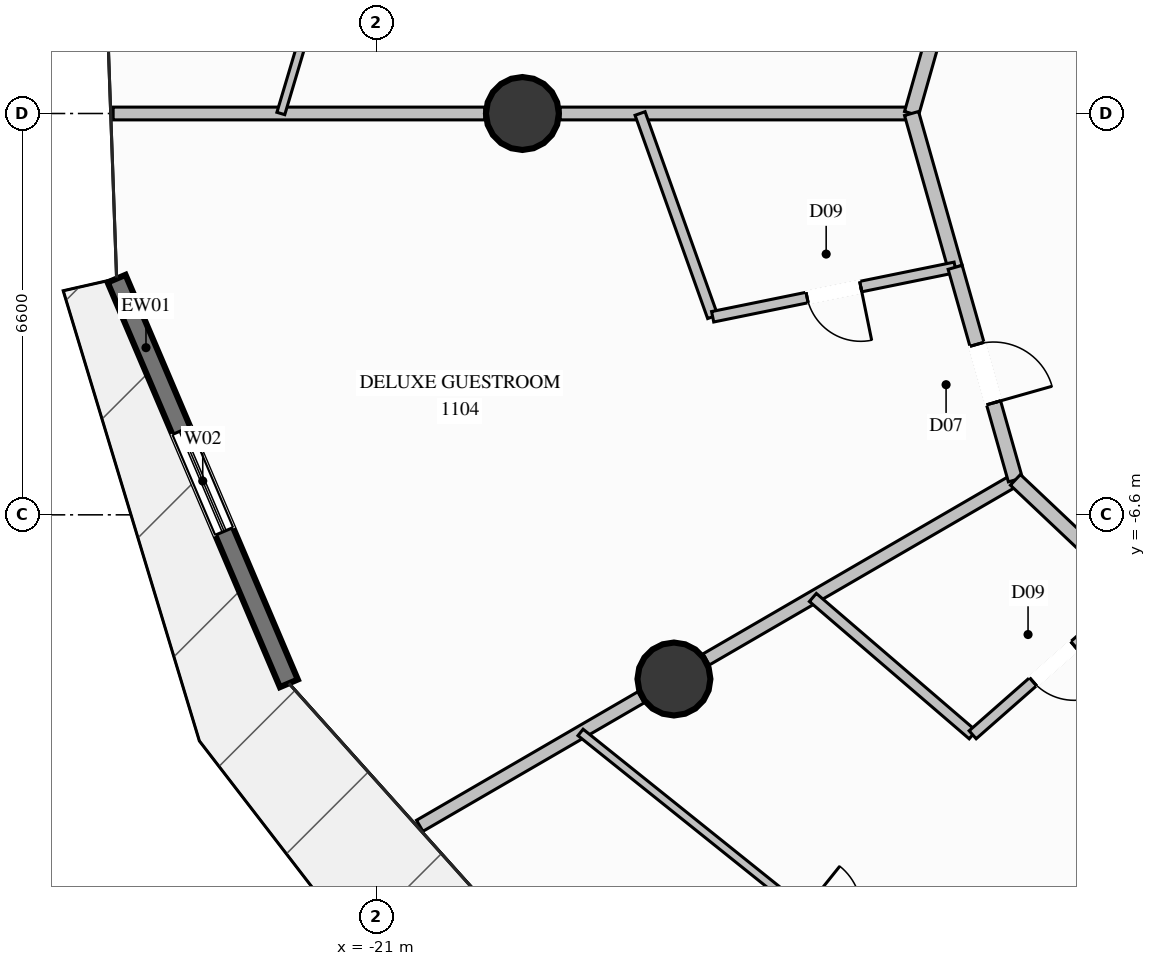
"""IFC4 building model, lengths in metres.
Left out: names, types, materials, properties, quantities, classifications, styles, units other than length and angle.
Written with IfcOpenShell. Run it as: python <this file> out.ifc"""

import sys

from ifc_helpers import new_model, si_unit, direction, frame, frame_2d, origin, origin_2d, place, context, subcontext, project, spatial, rectangle, circle, extrude, element, fill, save


model = new_model("IFC4")
c1 = context("Model", 3, precision=1e-05, world=origin(), true_north=direction((0.0, 1.0)))
c2 = subcontext(c1, "Body", "Model", "MODEL_VIEW")
j1 = project(units=[si_unit("LENGTHUNIT", "METRE"), si_unit("PLANEANGLEUNIT", "RADIAN")], contexts=[c1])
p1 = place(None, origin())
s1 = spatial("IfcSite", under=j1, at=p1, CompositionType="ELEMENT")
p2 = place(p1, origin())
s2 = spatial("IfcBuilding", under=s1, at=p2, CompositionType="ELEMENT")
p3 = place(p2, frame((0.0, 0.0, 42.8)))
s3 = spatial("IfcBuildingStorey", under=s2, at=p3, CompositionType="ELEMENT", Elevation=42.8)
for number, where, z_axis, x_axis in (
    (1, (-18.6, 0.0, 0.0), (0.0, 0.0, 1.0), (1.0, 0.0, 0.0)),
    (2, (-16.108, -9.3, 0.0), (0.0, 0.0, 1.0), (1.0, 0.0, 0.0)),
):
    element("IfcColumn", number, at=place(p3, frame(where, z_axis=z_axis, x_axis=x_axis)), inside=s3, PredefinedType="COLUMN", context=c2, shape_type="SweptSolid", body=[
        extrude(circle(Radius=0.6, at=origin_2d()), origin(), (0.0, 0.0, 1.0), 3.6),
    ])
p4 = place(p3, frame((-22.441, -9.371, 0.0), z_axis=(0.0, 0.0, 1.0), x_axis=(-0.391681637704, 0.920100806806, 0.0)))
e3 = element("IfcWall", 3, at=p4, inside=s3, PredefinedType="SOLIDWALL", context=c2, shape_type="SweptSolid", body=[
    extrude(rectangle(XDim=7.233, YDim=0.32, at=frame_2d((3.616, 0.0))), origin(), (0.0, 0.0, 1.0), 3.34),
])
p5 = place(p4, frame((2.716, 0.0, 0.35)))
e4 = element("IfcOpeningElement", 4, at=p5, cuts=e3, PredefinedType="OPENING", context=c2, shape_type="SweptSolid", body=[
    extrude(rectangle(XDim=1.8, YDim=2.6, at=frame_2d((0.9, 1.3))), frame((0.0, 0.17, 0.0), z_axis=(0.0, -1.0, 0.0), x_axis=(1.0, 0.0, 0.0)), (0.0, 0.0, 1.0), 0.34),
])
p6 = place(p3, frame((-12.2, 0.0, 0.0), z_axis=(0.0, 0.0, 1.0), x_axis=(-1.0, 0.0, 0.0)))
e5 = element("IfcWall", 5, at=p6, inside=s3, PredefinedType="PARTITIONING", context=c2, shape_type="SweptSolid", body=[
    extrude(rectangle(XDim=5.78, YDim=0.21, at=frame_2d((2.89, 0.0))), origin(), (0.0, 0.0, 1.0), 2.708),
])
p7 = place(p3, frame((-19.22, 0.0, 0.0), z_axis=(0.0, 0.0, 1.0), x_axis=(-1.0, 0.0, 0.0)))
e6 = element("IfcWall", 6, at=p7, inside=s3, PredefinedType="PARTITIONING", context=c2, shape_type="SweptSolid", body=[
    extrude(rectangle(XDim=6.111, YDim=0.21, at=frame_2d((3.056, 0.0))), origin(), (0.0, 0.0, 1.0), 3.34),
])
p8 = place(p3, frame((-10.492, -6.025, 0.0), z_axis=(0.0, 0.0, 1.0), x_axis=(-0.86478894661, -0.502135517387, 0.0)))
e7 = element("IfcWall", 7, at=p8, inside=s3, PredefinedType="PARTITIONING", context=c2, shape_type="SweptSolid", body=[
    extrude(rectangle(XDim=5.881, YDim=0.21, at=frame_2d((2.94, 0.0))), origin(), (0.0, 0.0, 1.0), 2.708),
])
p9 = place(p3, frame((-16.65, -9.601, 0.0), z_axis=(0.0, 0.0, 1.0), x_axis=(-0.86479138464, -0.502131318534, 0.0)))
e8 = element("IfcWall", 8, at=p9, inside=s3, PredefinedType="PARTITIONING", context=c2, shape_type="SweptSolid", body=[
    extrude(rectangle(XDim=4.208, YDim=0.21, at=frame_2d((2.104, 0.0))), origin(), (0.0, 0.0, 1.0), 3.34),
])
p10 = place(p3, frame((-10.492, 6.025, 0.0), z_axis=(0.0, 0.0, 1.0), x_axis=(-0.272743314702, -0.962086838225, 0.0)))
e9 = element("IfcWall", 9, at=p10, inside=s3, PredefinedType="PARTITIONING", context=c2, shape_type="SweptSolid", body=[
    extrude(rectangle(XDim=6.262, YDim=0.24, at=frame_2d((3.131, 0.0))), origin(), (0.0, 0.0, 1.0), 3.34),
])
p11 = place(p3, frame((-19.256, 11.111, 0.0), z_axis=(0.0, 0.0, 1.0), x_axis=(-0.28604764492, -0.958215395846, 0.0)))
e10 = element("IfcWall", 10, at=p11, inside=s3, PredefinedType="PARTITIONING", context=c2, shape_type="SweptSolid", body=[
    extrude(rectangle(XDim=11.596, YDim=0.135, at=frame_2d((5.798, 0.0))), origin(), (0.0, 0.0, 1.0), 3.34),
])
p12 = place(p11, frame((5.323, 0.0, 0.0)))
e11 = element("IfcOpeningElement", 11, at=p12, cuts=e10, PredefinedType="OPENING", context=c2, shape_type="SweptSolid", body=[
    extrude(rectangle(XDim=0.95, YDim=2.1, at=frame_2d((0.475, 1.05))), frame((0.0, 0.078, 0.0), z_axis=(0.0, -1.0, 0.0), x_axis=(1.0, 0.0, 0.0)), (0.0, 0.0, 1.0), 0.155),
])
p13 = place(p3, frame((-12.2, 0.0, 0.0), z_axis=(0.0, 0.0, 1.0), x_axis=(0.272672757197, -0.962106837873, 0.0)))
e12 = element("IfcWall", 12, at=p13, inside=s3, PredefinedType="PARTITIONING", context=c2, shape_type="SweptSolid", body=[
    extrude(rectangle(XDim=2.63, YDim=0.24, at=frame_2d((1.315, 0.0))), origin(), (0.0, 0.0, 1.0), 3.34),
])
p14 = place(p3, frame((-16.665, 0.0, 0.0), z_axis=(0.0, 0.0, 1.0), x_axis=(0.336375607453, -0.941727906941, 0.0)))
e13 = element("IfcWall", 13, at=p14, inside=s3, PredefinedType="PLUMBINGWALL", context=c2, shape_type="SweptSolid", body=[
    extrude(rectangle(XDim=3.55, YDim=0.175, at=frame_2d((1.775, 0.0))), origin(), (0.0, 0.0, 1.0), 3.34),
])
p15 = place(p3, frame((-11.483, -2.53, 0.0), z_axis=(0.0, 0.0, 1.0), x_axis=(-0.979847207533, -0.19974846655, 0.0)))
e14 = element("IfcWall", 14, at=p15, inside=s3, PredefinedType="PLUMBINGWALL", context=c2, shape_type="SweptSolid", body=[
    extrude(rectangle(XDim=4.07, YDim=0.175, at=frame_2d((2.035, 0.0))), origin(), (0.0, 0.0, 1.0), 3.34),
])
p16 = place(p15, frame((1.585, 0.0, 0.0)))
e15 = element("IfcOpeningElement", 15, at=p16, cuts=e14, PredefinedType="OPENING", context=c2, shape_type="SweptSolid", body=[
    extrude(rectangle(XDim=0.9, YDim=2.1, at=frame_2d((0.45, 1.05))), frame((0.0, 0.098, 0.0), z_axis=(0.0, -1.0, 0.0), x_axis=(1.0, 0.0, 0.0)), (0.0, 0.0, 1.0), 0.195),
])
p17 = place(p3, frame((-11.483, -2.53, 0.0), z_axis=(0.0, 0.0, 1.0), x_axis=(0.272794390365, -0.96207235725, 0.0)))
e16 = element("IfcWall", 16, at=p17, inside=s3, PredefinedType="PARTITIONING", context=c2, shape_type="SweptSolid", body=[
    extrude(rectangle(XDim=3.633, YDim=0.24, at=frame_2d((1.816, 0.0))), origin(), (0.0, 0.0, 1.0), 3.34),
])
p18 = place(p17, frame((1.316, 0.0, 0.0)))
e17 = element("IfcOpeningElement", 17, at=p18, cuts=e16, PredefinedType="OPENING", context=c2, shape_type="SweptSolid", body=[
    extrude(rectangle(XDim=1.0, YDim=2.2, at=frame_2d((0.5, 1.1))), frame((0.0, 0.13, 0.0), z_axis=(0.0, -1.0, 0.0), x_axis=(1.0, 0.0, 0.0)), (0.0, 0.0, 1.0), 0.26),
])
p19 = place(p3, frame((-10.492, -6.025, 0.0), z_axis=(0.0, 0.0, 1.0), x_axis=(0.726651583854, -0.687006168591, 0.0)))
e18 = element("IfcWall", 18, at=p19, inside=s3, PredefinedType="PARTITIONING", context=c2, shape_type="SweptSolid", body=[
    extrude(rectangle(XDim=2.697, YDim=0.24, at=frame_2d((1.349, 0.0))), origin(), (0.0, 0.0, 1.0), 3.34),
])
p20 = place(p3, frame((-13.823, -7.959, 0.0), z_axis=(0.0, 0.0, 1.0), x_axis=(0.758465196679, -0.65171354553, 0.0)))
e19 = element("IfcWall", 19, at=p20, inside=s3, PredefinedType="PLUMBINGWALL", context=c2, shape_type="SweptSolid", body=[
    extrude(rectangle(XDim=3.465, YDim=0.175, at=frame_2d((1.732, 0.0))), origin(), (0.0, 0.0, 1.0), 3.34),
])
p21 = place(p3, frame((-8.532, -7.878, 0.0), z_axis=(0.0, 0.0, 1.0), x_axis=(-0.751329434658, -0.6599273298, 0.0)))
e20 = element("IfcWall", 20, at=p21, inside=s3, PredefinedType="PLUMBINGWALL", context=c2, shape_type="SweptSolid", body=[
    extrude(rectangle(XDim=3.544, YDim=0.175, at=frame_2d((1.772, 0.0))), origin(), (0.0, 0.0, 1.0), 3.34),
])
p22 = place(p21, frame((1.322, 0.0, 0.0)))
e21 = element("IfcOpeningElement", 21, at=p22, cuts=e20, PredefinedType="OPENING", context=c2, shape_type="SweptSolid", body=[
    extrude(rectangle(XDim=0.9, YDim=2.1, at=frame_2d((0.45, 1.05))), frame((0.0, 0.098, 0.0), z_axis=(0.0, -1.0, 0.0), x_axis=(1.0, 0.0, 0.0)), (0.0, 0.0, 1.0), 0.195),
])
p23 = place(p3, frame((-17.644, -10.178, 0.0), z_axis=(0.0, 0.0, 1.0), x_axis=(0.780247491349, -0.625470904394, 0.0)))
e22 = element("IfcWall", 22, at=p23, inside=s3, PredefinedType="PARTITIONING", context=c2, shape_type="SweptSolid", body=[
    extrude(rectangle(XDim=10.357, YDim=0.135, at=frame_2d((5.178, 0.0))), origin(), (0.0, 0.0, 1.0), 2.791),
])
p24 = place(p23, frame((4.703, 0.0, 0.0)))
e23 = element("IfcOpeningElement", 23, at=p24, cuts=e22, PredefinedType="OPENING", context=c2, shape_type="SweptSolid", body=[
    extrude(rectangle(XDim=0.95, YDim=2.1, at=frame_2d((0.475, 1.05))), frame((0.0, 0.078, 0.0), z_axis=(0.0, -1.0, 0.0), x_axis=(1.0, 0.0, 0.0)), (0.0, 0.0, 1.0), 0.155),
])
p25 = place(p5, origin())
e24 = element("IfcWindow", 24, at=p25, inside=s3, PartitioningType="SINGLE_PANEL", PredefinedType="WINDOW", context=c2, shape_type="SweptSolid", body=[
    extrude(rectangle(XDim=1.8, YDim=2.6, at=frame_2d((0.9, 1.3))), frame((0.0, 0.03, 0.0), z_axis=(0.0, -1.0, 0.0), x_axis=(1.0, 0.0, 0.0)), (0.0, 0.0, 1.0), 0.06),
])
fill(e4, e24)
p26 = place(p16, origin())
e25 = element("IfcDoor", 25, at=p26, inside=s3, OperationType="SINGLE_SWING_LEFT", PredefinedType="DOOR", context=c2, shape_type="SweptSolid", body=[
    extrude(rectangle(XDim=0.9, YDim=2.1, at=frame_2d((0.45, 1.05))), frame((0.0, 0.025, 0.0), z_axis=(0.0, -1.0, 0.0), x_axis=(1.0, 0.0, 0.0)), (0.0, 0.0, 1.0), 0.05),
])
fill(e15, e25)
p27 = place(p18, origin())
e26 = element("IfcDoor", 26, at=p27, inside=s3, OperationType="SINGLE_SWING_RIGHT", PredefinedType="DOOR", context=c2, shape_type="SweptSolid", body=[
    extrude(rectangle(XDim=1.0, YDim=2.2, at=frame_2d((0.5, 1.1))), frame((0.0, 0.025, 0.0), z_axis=(0.0, -1.0, 0.0), x_axis=(1.0, 0.0, 0.0)), (0.0, 0.0, 1.0), 0.05),
])
fill(e17, e26)
p28 = place(p22, origin())
e27 = element("IfcDoor", 27, at=p28, inside=s3, OperationType="SINGLE_SWING_LEFT", PredefinedType="DOOR", context=c2, shape_type="SweptSolid", body=[
    extrude(rectangle(XDim=0.9, YDim=2.1, at=frame_2d((0.45, 1.05))), frame((0.0, 0.025, 0.0), z_axis=(0.0, -1.0, 0.0), x_axis=(1.0, 0.0, 0.0)), (0.0, 0.0, 1.0), 0.05),
])
fill(e21, e27)
save(model, sys.argv[1])
